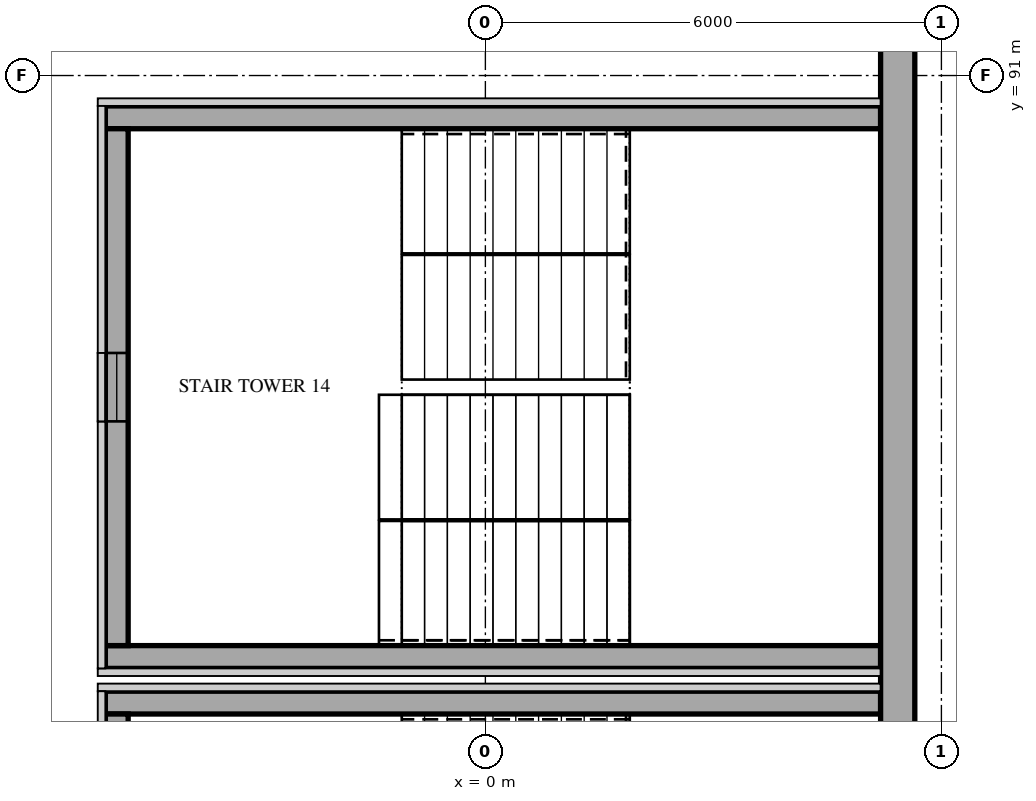
"""IFC4 building model, lengths in metres.
Left out: names, types, materials, properties, quantities, classifications, styles, units other than length and angle.
Written with IfcOpenShell. Run it as: python <this file> out.ifc"""

import sys

from ifc_helpers import new_model, si_unit, direction, frame, frame_2d, origin, place, context, subcontext, project, spatial, rectangle, extrude, element, fill, save


model = new_model("IFC4")
c1 = context("Model", 3, precision=1e-05, world=origin(), true_north=direction((0.0, 1.0)))
c2 = subcontext(c1, "Body", "Model", "MODEL_VIEW")
j1 = project(units=[si_unit("LENGTHUNIT", "METRE"), si_unit("PLANEANGLEUNIT", "RADIAN")], contexts=[c1])
p1 = place(None, origin())
s1 = spatial("IfcSite", under=j1, at=p1, CompositionType="ELEMENT")
p2 = place(p1, origin())
s2 = spatial("IfcBuilding", under=s1, at=p2, CompositionType="ELEMENT")
p3 = place(p2, frame((0.0, 0.0, 10.0)))
s3 = spatial("IfcBuildingStorey", under=s2, at=p3, CompositionType="ELEMENT", Elevation=10.0)
p4 = place(p3, frame((5.2, 82.75, 0.0), z_axis=(0.0, 0.0, 1.0), x_axis=(-1.0, 0.0, 0.0)))
e1 = element("IfcWall", 1, at=p4, inside=s3, PredefinedType="SHEAR", context=c2, shape_type="SweptSolid", body=[
    extrude(rectangle(XDim=10.2, YDim=0.3, at=frame_2d((5.1, 0.0))), origin(), (0.0, 0.0, 1.0), 5.0),
])
p5 = place(p3, frame((-4.85, 75.8, 0.0), z_axis=(0.0, 0.0, 1.0), x_axis=(0.0, 1.0, 0.0)))
e2 = element("IfcWall", 2, at=p5, inside=s3, PredefinedType="SHEAR", context=c2, shape_type="SweptSolid", body=[
    extrude(rectangle(XDim=6.8, YDim=0.3, at=frame_2d((3.4, 0.0))), origin(), (0.0, 0.0, 1.0), 5.0),
])
p6 = place(p5, frame((2.95, 0.0, 0.9)))
e3 = element("IfcOpeningElement", 3, at=p6, cuts=e2, PredefinedType="OPENING", context=c2, shape_type="SweptSolid", body=[
    extrude(rectangle(XDim=0.9, YDim=1.5, at=frame_2d((0.45, 0.75))), frame((0.0, 0.16, 0.0), z_axis=(0.0, -1.0, 0.0), x_axis=(1.0, 0.0, 0.0)), (0.0, 0.0, 1.0), 0.32),
])
for number, where, z_axis, x_axis in (
    (4, (5.2, 83.35, 0.0), (0.0, 0.0, 1.0), (-1.0, 0.0, 0.0)),
    (5, (5.2, 90.45, 0.0), (0.0, 0.0, 1.0), (-1.0, 0.0, 0.0)),
):
    element("IfcWall", number, at=place(p3, frame(where, z_axis=z_axis, x_axis=x_axis)), inside=s3, PredefinedType="SHEAR", context=c2, shape_type="SweptSolid", body=[
        extrude(rectangle(XDim=10.2, YDim=0.3, at=frame_2d((5.1, 0.0))), origin(), (0.0, 0.0, 1.0), 5.0),
    ])
p7 = place(p3, frame((-4.85, 83.5, 0.0), z_axis=(0.0, 0.0, 1.0), x_axis=(0.0, 1.0, 0.0)))
e6 = element("IfcWall", 6, at=p7, inside=s3, PredefinedType="SHEAR", context=c2, shape_type="SweptSolid", body=[
    extrude(rectangle(XDim=6.8, YDim=0.3, at=frame_2d((3.4, 0.0))), origin(), (0.0, 0.0, 1.0), 5.0),
])
p8 = place(p7, frame((2.95, 0.0, 0.9)))
e7 = element("IfcOpeningElement", 7, at=p8, cuts=e6, PredefinedType="OPENING", context=c2, shape_type="SweptSolid", body=[
    extrude(rectangle(XDim=0.9, YDim=1.5, at=frame_2d((0.45, 0.75))), frame((0.0, 0.16, 0.0), z_axis=(0.0, -1.0, 0.0), x_axis=(1.0, 0.0, 0.0)), (0.0, 0.0, 1.0), 0.32),
])
p9 = place(p3, frame((5.425, 46.75, 0.0), z_axis=(0.0, 0.0, 1.0), x_axis=(0.0, 1.0, 0.0)))
e8 = element("IfcWall", 8, at=p9, inside=s3, PredefinedType="SOLIDWALL", context=c2, shape_type="SweptSolid", body=[
    extrude(rectangle(XDim=61.65, YDim=0.45, at=frame_2d((30.825, 0.0))), origin(), (0.0, 0.0, 1.0), 5.0),
])
p10 = place(p9, frame((45.75, 0.0, 0.0)))
e9 = element("IfcOpeningElement", 9, at=p10, cuts=e8, PredefinedType="OPENING", context=c2, shape_type="SweptSolid", body=[
    extrude(rectangle(XDim=6.0, YDim=0.6, at=frame_2d((3.0, 0.3))), frame((0.0, 0.235, 0.0), z_axis=(0.0, -1.0, 0.0), x_axis=(1.0, 0.0, 0.0)), (0.0, 0.0, 1.0), 0.47),
])
p11 = place(p9, frame((54.75, 0.0, 0.0)))
e10 = element("IfcOpeningElement", 10, at=p11, cuts=e8, PredefinedType="OPENING", context=c2, shape_type="SweptSolid", body=[
    extrude(rectangle(XDim=6.0, YDim=0.6, at=frame_2d((3.0, 0.3))), frame((0.0, 0.235, 0.0), z_axis=(0.0, -1.0, 0.0), x_axis=(1.0, 0.0, 0.0)), (0.0, 0.0, 1.0), 0.47),
])
p12 = place(p8, origin())
e11 = element("IfcWindow", 11, at=p12, inside=s3, PartitioningType="SINGLE_PANEL", PredefinedType="WINDOW", context=c2, shape_type="SweptSolid", body=[
    extrude(rectangle(XDim=0.9, YDim=1.5, at=frame_2d((0.45, 0.75))), frame((0.0, 0.03, 0.0), z_axis=(0.0, -1.0, 0.0), x_axis=(1.0, 0.0, 0.0)), (0.0, 0.0, 1.0), 0.06),
])
fill(e7, e11)
save(model, sys.argv[1])
